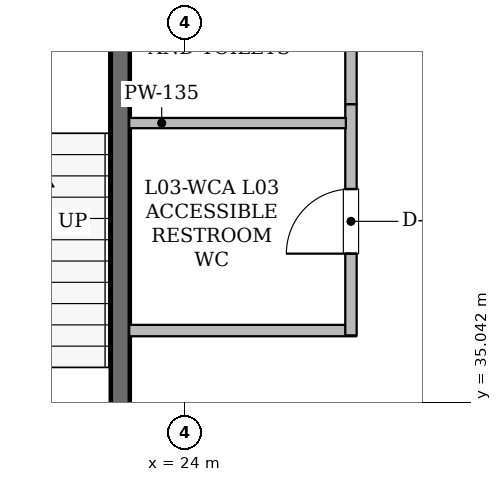
"""IFC4 building model, lengths in metres.
Left out: names, types, materials, properties, quantities, classifications, styles, units other than length and angle.
Written with IfcOpenShell. Run it as: python <this file> out.ifc"""

import sys

from ifc_helpers import new_model, si_unit, direction, frame, frame_2d, origin, place, context, subcontext, project, spatial, rectangle, extrude, element, fill, save


model = new_model("IFC4")
c1 = context("Model", 3, precision=1e-05, world=origin(), true_north=direction((0.0, 1.0)))
c2 = subcontext(c1, "Body", "Model", "MODEL_VIEW")
j1 = project(units=[si_unit("LENGTHUNIT", "METRE"), si_unit("PLANEANGLEUNIT", "RADIAN")], contexts=[c1])
p1 = place(None, origin())
s1 = spatial("IfcSite", under=j1, at=p1, CompositionType="ELEMENT")
p2 = place(p1, origin())
s2 = spatial("IfcBuilding", under=s1, at=p2, CompositionType="ELEMENT")
p3 = place(p2, frame((0.0, 0.0, 16.2)))
s3 = spatial("IfcBuildingStorey", under=s2, at=p3, CompositionType="ELEMENT", Elevation=16.2)
p4 = place(p3, frame((23.15, 33.6, 0.0), z_axis=(0.0, 0.0, 1.0), x_axis=(0.0, 1.0, 0.0)))
e1 = element("IfcWall", 1, at=p4, inside=s3, PredefinedType="SHEAR", context=c2, shape_type="SweptSolid", body=[
    extrude(rectangle(XDim=9.2, YDim=0.25, at=frame_2d((4.6, 0.0))), origin(), (0.0, 0.0, 1.0), 3.92),
])
p5 = place(p4, frame((0.4, 0.0, 0.0)))
e2 = element("IfcOpeningElement", 2, at=p5, cuts=e1, PredefinedType="OPENING", context=c2, shape_type="SweptSolid", body=[
    extrude(rectangle(XDim=1.0, YDim=2.15, at=frame_2d((0.5, 1.075))), frame((0.0, 0.135, 0.0), z_axis=(0.0, -1.0, 0.0), x_axis=(1.0, 0.0, 0.0)), (0.0, 0.0, 1.0), 0.27),
])
p6 = place(p3, frame((23.267, 35.985, 0.0), z_axis=(0.0, 0.0, 1.0), x_axis=(1.0, 0.0, 0.0)))
e3 = element("IfcWall", 3, at=p6, inside=s3, PredefinedType="STANDARD", context=c2, shape_type="SweptSolid", body=[
    extrude(rectangle(XDim=2.983, YDim=0.15, at=frame_2d((1.491, 0.0))), origin(), (0.0, 0.0, 1.0), 3.92),
])
p7 = place(p3, frame((26.185, 35.922, 0.0), z_axis=(0.0, 0.0, 1.0), x_axis=(0.0, 1.0, 0.0)))
e4 = element("IfcWall", 4, at=p7, inside=s3, PredefinedType="STANDARD", context=c2, shape_type="SweptSolid", body=[
    extrude(rectangle(XDim=3.042, YDim=0.15, at=frame_2d((1.521, 0.0))), origin(), (0.0, 0.0, 1.0), 3.92),
])
p8 = place(p7, frame((1.075, 0.0, 0.0)))
e5 = element("IfcOpeningElement", 5, at=p8, cuts=e4, PredefinedType="OPENING", context=c2, shape_type="SweptSolid", body=[
    extrude(rectangle(XDim=0.85, YDim=2.1, at=frame_2d((0.425, 1.05))), frame((0.0, 0.085, 0.0), z_axis=(0.0, -1.0, 0.0), x_axis=(1.0, 0.0, 0.0)), (0.0, 0.0, 1.0), 0.17),
])
p9 = place(p3, frame((26.185, 38.964, 0.0), z_axis=(0.0, 0.0, 1.0), x_axis=(0.0, 1.0, 0.0)))
e6 = element("IfcWall", 6, at=p9, inside=s3, PredefinedType="STANDARD", context=c2, shape_type="SweptSolid", body=[
    extrude(rectangle(XDim=4.086, YDim=0.15, at=frame_2d((2.043, 0.0))), origin(), (0.0, 0.0, 1.0), 3.92),
])
p10 = place(p9, frame((1.618, 0.0, 0.0)))
e7 = element("IfcOpeningElement", 7, at=p10, cuts=e6, PredefinedType="OPENING", context=c2, shape_type="SweptSolid", body=[
    extrude(rectangle(XDim=0.85, YDim=2.1, at=frame_2d((0.425, 1.05))), frame((0.0, 0.085, 0.0), z_axis=(0.0, -1.0, 0.0), x_axis=(1.0, 0.0, 0.0)), (0.0, 0.0, 1.0), 0.17),
])
p11 = place(p3, frame((23.267, 38.715, 0.0), z_axis=(0.0, 0.0, 1.0), x_axis=(1.0, 0.0, 0.0)))
e8 = element("IfcWall", 8, at=p11, inside=s3, PredefinedType="PARTITIONING", context=c2, shape_type="SweptSolid", body=[
    extrude(rectangle(XDim=2.851, YDim=0.135, at=frame_2d((1.425, 0.0))), origin(), (0.0, 0.0, 1.0), 3.92),
])
p12 = place(p8, origin())
e9 = element("IfcDoor", 9, at=p12, inside=s3, OperationType="SINGLE_SWING_LEFT", PredefinedType="DOOR", context=c2, shape_type="SweptSolid", body=[
    extrude(rectangle(XDim=0.85, YDim=2.1, at=frame_2d((0.425, 1.05))), frame((0.0, 0.025, 0.0), z_axis=(0.0, -1.0, 0.0), x_axis=(1.0, 0.0, 0.0)), (0.0, 0.0, 1.0), 0.05),
])
fill(e5, e9)
save(model, sys.argv[1])
